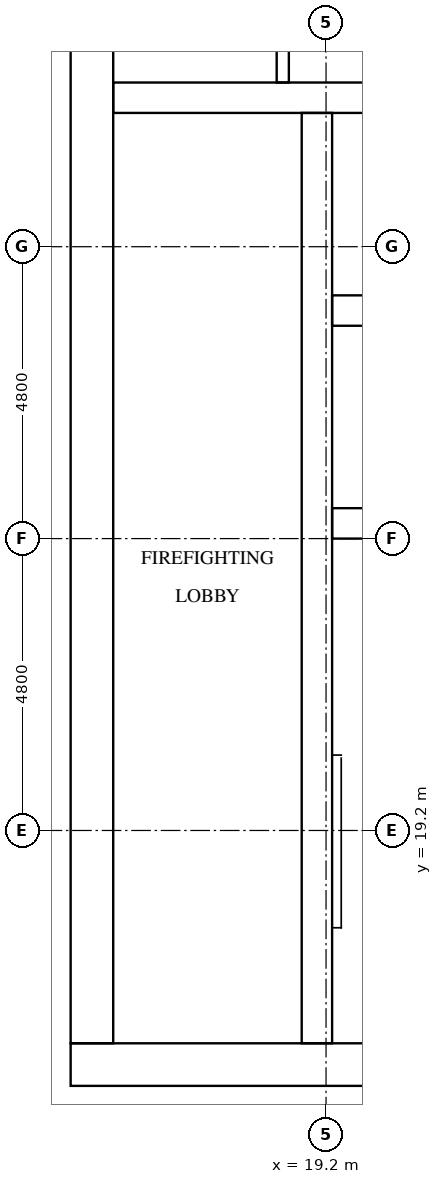
"""IFC4 building model, lengths in metres.
Left out: names, types, materials, properties, quantities, classifications, styles, units other than length and angle.
Written with IfcOpenShell. Run it as: python <this file> out.ifc"""

import sys

from ifc_helpers import new_model, si_unit, direction, frame, frame_2d, origin, place, context, subcontext, project, spatial, rectangle, extrude, element, fill, save


model = new_model("IFC4")
c1 = context("Model", 3, precision=1e-05, world=origin(), true_north=direction((0.0, 1.0)))
c2 = subcontext(c1, "Body", "Model", "MODEL_VIEW")
j1 = project(units=[si_unit("LENGTHUNIT", "METRE"), si_unit("PLANEANGLEUNIT", "RADIAN")], contexts=[c1])
p1 = place(None, origin())
s1 = spatial("IfcSite", under=j1, at=p1, CompositionType="ELEMENT")
p2 = place(p1, origin())
s2 = spatial("IfcBuilding", under=s1, at=p2, CompositionType="ELEMENT")
p3 = place(p2, frame((0.0, 0.0, 185.9)))
s3 = spatial("IfcBuildingStorey", under=s2, at=p3, CompositionType="ELEMENT", Elevation=185.9)
p4 = place(p3, frame((15.0, 15.35, 0.0), z_axis=(0.0, 0.0, 1.0), x_axis=(1.0, 0.0, 0.0)))
e1 = element("IfcWall", 1, at=p4, inside=s3, PredefinedType="SHEAR", context=c2, shape_type="SweptSolid", body=[
    extrude(rectangle(XDim=32.4, YDim=0.7, at=frame_2d((16.2, 0.0))), origin(), (0.0, 0.0, 1.0), 3.2),
])
p5 = place(p4, frame((15.3, 0.0, 0.0)))
e2 = element("IfcOpeningElement", 2, at=p5, cuts=e1, PredefinedType="OPENING", context=c2, shape_type="SweptSolid", body=[
    extrude(rectangle(XDim=1.8, YDim=2.1, at=frame_2d((0.9, 1.05))), frame((0.0, 0.36, 0.0), z_axis=(0.0, -1.0, 0.0), x_axis=(1.0, 0.0, 0.0)), (0.0, 0.0, 1.0), 0.72),
])
p6 = place(p3, frame((15.35, 15.7, 0.0), z_axis=(0.0, 0.0, 1.0), x_axis=(0.0, 1.0, 0.0)))
e3 = element("IfcWall", 3, at=p6, inside=s3, PredefinedType="SHEAR", context=c2, shape_type="SweptSolid", body=[
    extrude(rectangle(XDim=21.4, YDim=0.7, at=frame_2d((10.7, 0.0))), origin(), (0.0, 0.0, 1.0), 3.2),
])
p7 = place(p6, frame((5.06, 0.0, 0.0)))
e4 = element("IfcOpeningElement", 4, at=p7, cuts=e3, PredefinedType="OPENING", context=c2, shape_type="SweptSolid", body=[
    extrude(rectangle(XDim=1.2, YDim=2.1, at=frame_2d((0.6, 1.05))), frame((0.0, 0.36, 0.0), z_axis=(0.0, -1.0, 0.0), x_axis=(1.0, 0.0, 0.0)), (0.0, 0.0, 1.0), 0.72),
])
p8 = place(p3, frame((19.05, 15.7, 0.0), z_axis=(0.0, 0.0, 1.0), x_axis=(0.0, 1.0, 0.0)))
e5 = element("IfcWall", 5, at=p8, inside=s3, PredefinedType="SHEAR", context=c2, shape_type="SweptSolid", body=[
    extrude(rectangle(XDim=15.3, YDim=0.5, at=frame_2d((7.65, 0.0))), origin(), (0.0, 0.0, 1.0), 3.2),
])
p9 = place(p8, frame((9.75, 0.0, 0.0)))
e6 = element("IfcOpeningElement", 6, at=p9, cuts=e5, PredefinedType="OPENING", context=c2, shape_type="SweptSolid", body=[
    extrude(rectangle(XDim=1.1, YDim=2.1, at=frame_2d((0.55, 1.05))), frame((0.0, 0.26, 0.0), z_axis=(0.0, -1.0, 0.0), x_axis=(1.0, 0.0, 0.0)), (0.0, 0.0, 1.0), 0.52),
])
p10 = place(p8, frame((13.25, 0.0, 0.0)))
e7 = element("IfcOpeningElement", 7, at=p10, cuts=e5, PredefinedType="OPENING", context=c2, shape_type="SweptSolid", body=[
    extrude(rectangle(XDim=1.1, YDim=2.1, at=frame_2d((0.55, 1.05))), frame((0.0, 0.26, 0.0), z_axis=(0.0, -1.0, 0.0), x_axis=(1.0, 0.0, 0.0)), (0.0, 0.0, 1.0), 0.52),
])
p11 = place(p8, frame((0.5, 0.0, 0.0)))
e8 = element("IfcOpeningElement", 8, at=p11, cuts=e5, PredefinedType="OPENING", context=c2, shape_type="SweptSolid", body=[
    extrude(rectangle(XDim=1.2, YDim=2.1, at=frame_2d((0.6, 1.05))), frame((0.0, 0.26, 0.0), z_axis=(0.0, -1.0, 0.0), x_axis=(1.0, 0.0, 0.0)), (0.0, 0.0, 1.0), 0.52),
])
for number, where, z_axis, x_axis in (
    (9, (19.3, 24.25, 0.0), (0.0, 0.0, 1.0), (1.0, 0.0, 0.0)),
    (10, (19.3, 27.75, 0.0), (0.0, 0.0, 1.0), (1.0, 0.0, 0.0)),
):
    element("IfcWall", number, at=place(p3, frame(where, z_axis=z_axis, x_axis=x_axis)), inside=s3, PredefinedType="SHEAR", context=c2, shape_type="SweptSolid", body=[
        extrude(rectangle(XDim=3.55, YDim=0.5, at=frame_2d((1.775, 0.0))), origin(), (0.0, 0.0, 1.0), 3.2),
    ])
p12 = place(p3, frame((15.7, 31.25, 0.0), z_axis=(0.0, 0.0, 1.0), x_axis=(1.0, 0.0, 0.0)))
e11 = element("IfcWall", 11, at=p12, inside=s3, PredefinedType="SHEAR", context=c2, shape_type="SweptSolid", body=[
    extrude(rectangle(XDim=7.15, YDim=0.5, at=frame_2d((3.575, 0.0))), origin(), (0.0, 0.0, 1.0), 3.2),
])
p13 = place(p3, frame((18.489, 31.5, 0.0), z_axis=(0.0, 0.0, 1.0), x_axis=(0.0, 1.0, 0.0)))
e12 = element("IfcWall", 12, at=p13, inside=s3, PredefinedType="PARTITIONING", context=c2, shape_type="SweptSolid", body=[
    extrude(rectangle(XDim=5.6, YDim=0.2, at=frame_2d((2.8, 0.0))), origin(), (0.0, 0.0, 1.0), 3.2),
])
p14 = place(p9, origin())
e13 = element("IfcDoor", 13, at=p14, inside=s3, OperationType="DOUBLE_DOOR_SLIDING", PredefinedType="DOOR", context=c2, shape_type="SweptSolid", body=[
    extrude(rectangle(XDim=1.1, YDim=2.1, at=frame_2d((0.55, 1.05))), frame((0.0, 0.025, 0.0), z_axis=(0.0, -1.0, 0.0), x_axis=(1.0, 0.0, 0.0)), (0.0, 0.0, 1.0), 0.05),
])
fill(e6, e13)
p15 = place(p10, origin())
e14 = element("IfcDoor", 14, at=p15, inside=s3, OperationType="DOUBLE_DOOR_SLIDING", PredefinedType="DOOR", context=c2, shape_type="SweptSolid", body=[
    extrude(rectangle(XDim=1.1, YDim=2.1, at=frame_2d((0.55, 1.05))), frame((0.0, 0.025, 0.0), z_axis=(0.0, -1.0, 0.0), x_axis=(1.0, 0.0, 0.0)), (0.0, 0.0, 1.0), 0.05),
])
fill(e7, e14)
p16 = place(p11, frame((1.2, 0.0, 0.0), z_axis=(0.0, 0.0, 1.0), x_axis=(-1.0, 0.0, 0.0)))
e15 = element("IfcDoor", 15, at=p16, inside=s3, OperationType="SINGLE_SWING_RIGHT", PredefinedType="DOOR", context=c2, shape_type="SweptSolid", body=[
    extrude(rectangle(XDim=1.2, YDim=2.1, at=frame_2d((0.6, 1.05))), frame((0.0, 0.025, 0.0), z_axis=(0.0, -1.0, 0.0), x_axis=(1.0, 0.0, 0.0)), (0.0, 0.0, 1.0), 0.05),
])
fill(e8, e15)
p17 = place(p7, frame((1.2, 0.0, 0.0), z_axis=(0.0, 0.0, 1.0), x_axis=(-1.0, 0.0, 0.0)))
e16 = element("IfcDoor", 16, at=p17, inside=s3, OperationType="SINGLE_SWING_LEFT", PredefinedType="DOOR", context=c2, shape_type="SweptSolid", body=[
    extrude(rectangle(XDim=1.2, YDim=2.1, at=frame_2d((0.6, 1.05))), frame((0.0, 0.025, 0.0), z_axis=(0.0, -1.0, 0.0), x_axis=(1.0, 0.0, 0.0)), (0.0, 0.0, 1.0), 0.05),
])
fill(e4, e16)
save(model, sys.argv[1])
